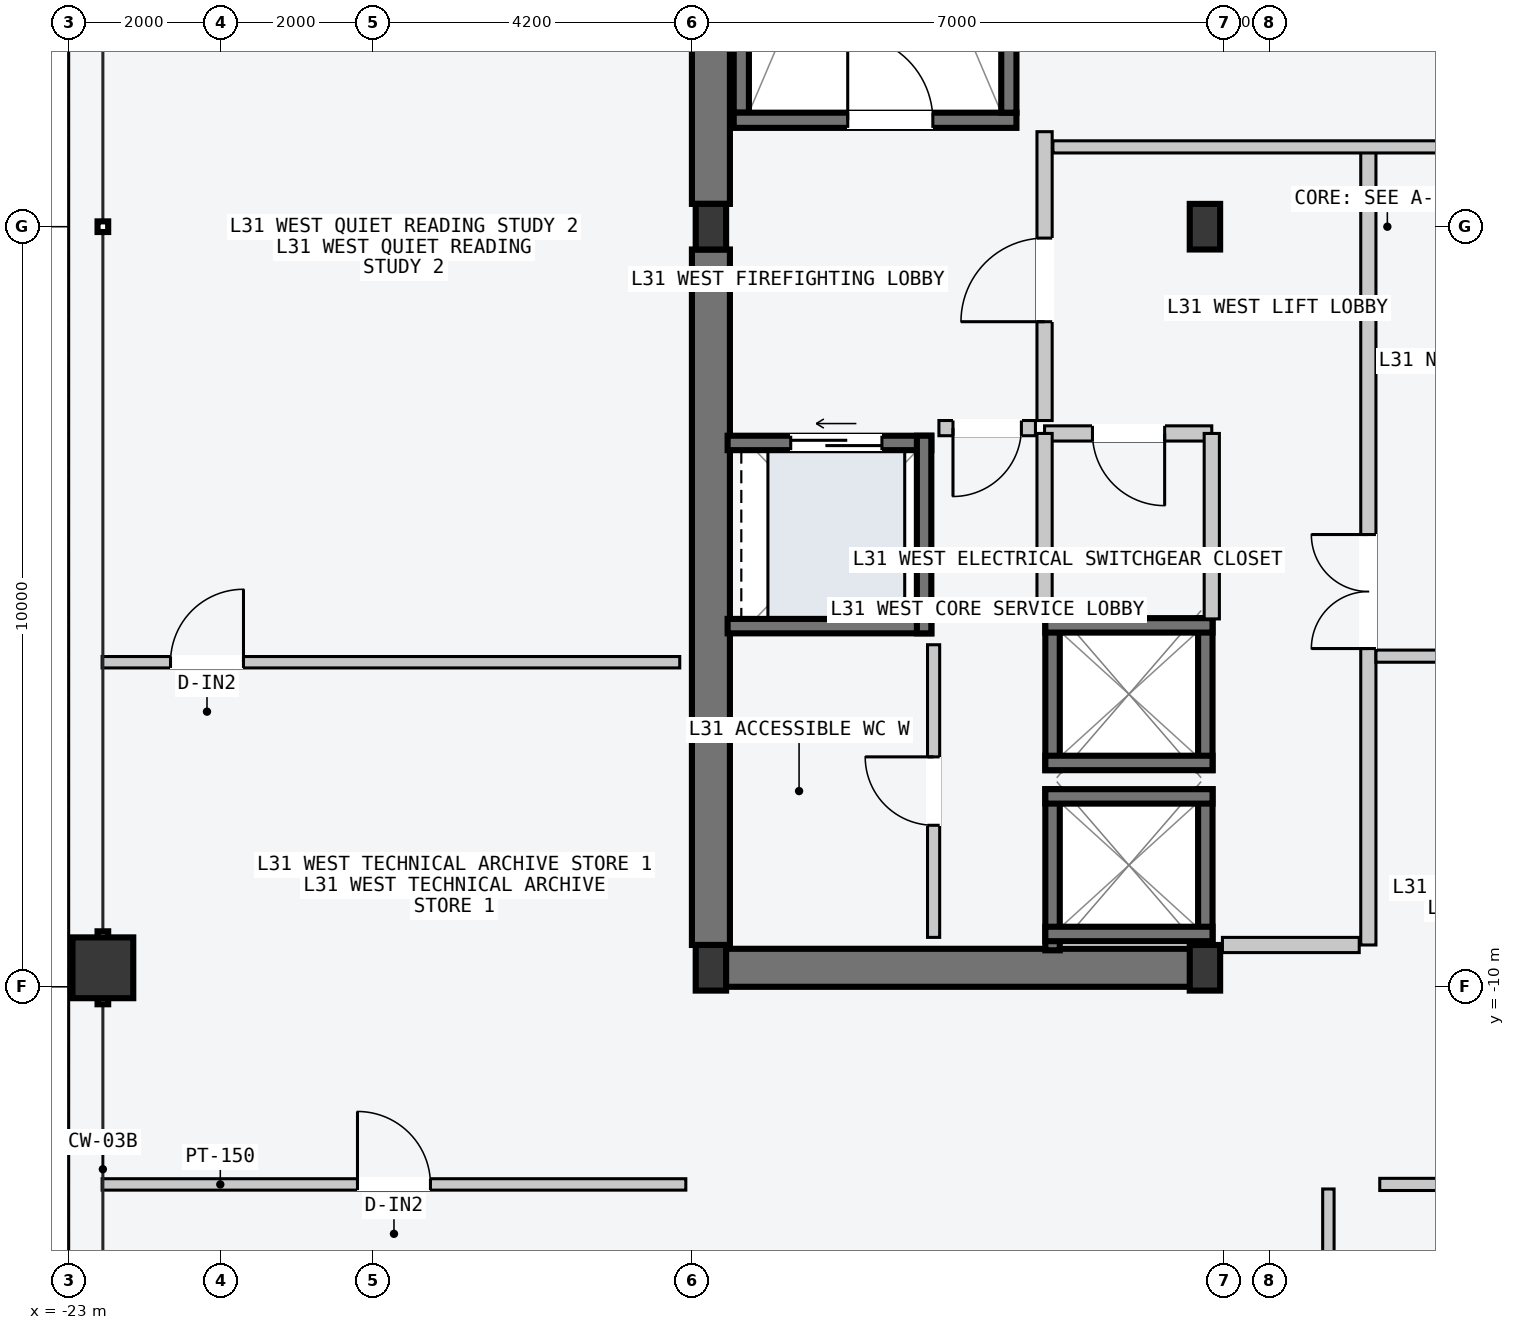
"""IFC4 building model, lengths in metres.
Left out: names, types, materials, properties, quantities, classifications, styles, units other than length and angle.
Written with IfcOpenShell. Run it as: python <this file> out.ifc"""

import sys

from ifc_helpers import new_model, si_unit, direction, frame, frame_2d, origin, origin_2d, place, context, subcontext, project, spatial, rectangle, hollow_rectangle, i_section, extrude, element, fill, save


model = new_model("IFC4")
c1 = context("Model", 3, precision=1e-05, world=origin(), true_north=direction((0.0, 1.0)))
c2 = subcontext(c1, "Body", "Model", "MODEL_VIEW")
j1 = project(units=[si_unit("LENGTHUNIT", "METRE"), si_unit("PLANEANGLEUNIT", "RADIAN")], contexts=[c1])
p1 = place(None, origin())
s1 = spatial("IfcSite", under=j1, at=p1, CompositionType="ELEMENT")
p2 = place(p1, origin())
s2 = spatial("IfcBuilding", under=s1, at=p2, CompositionType="ELEMENT")
p3 = place(p2, frame((0.0, 0.0, 120.6)))
s3 = spatial("IfcBuildingStorey", under=s2, at=p3, CompositionType="ELEMENT", Elevation=120.6)
p4 = place(p3, frame((-14.53, -9.75, -0.2), z_axis=(0.0, 0.0, 1.0), x_axis=(1.0, 0.0, 0.0)))
e1 = element("IfcWall", 1, at=p4, inside=s3, PredefinedType="SHEAR", context=c2, shape_type="SweptSolid", body=[
    extrude(rectangle(XDim=6.46, YDim=0.5, at=frame_2d((3.23, 0.0))), origin(), (0.0, 0.0, 1.0), 3.6),
])
for number, where, z_axis, x_axis in (
    (2, (-14.55, -9.45, -0.2), (0.0, 0.0, 1.0), (0.0, 1.0, 0.0)),
    (3, (-14.55, 0.3, -0.2), (0.0, 0.0, 1.0), (0.0, 1.0, 0.0)),
):
    element("IfcWall", number, at=place(p3, frame(where, z_axis=z_axis, x_axis=x_axis)), inside=s3, PredefinedType="SHEAR", context=c2, shape_type="SweptSolid", body=[
        extrude(rectangle(XDim=9.15, YDim=0.5, at=frame_2d((4.575, 0.0))), origin(), (0.0, 0.0, 1.0), 3.6),
    ])
p5 = place(p3, frame((-14.15, 1.5, -0.2), z_axis=(0.0, 0.0, 1.0), x_axis=(0.0, 1.0, 0.0)))
e4 = element("IfcWall", 4, at=p5, inside=s3, PredefinedType="SOLIDWALL", context=c2, shape_type="SweptSolid", body=[
    extrude(rectangle(XDim=7.8, YDim=0.2, at=frame_2d((3.9, 0.0))), origin(), (0.0, 0.0, 1.0), 3.6),
])
p6 = place(p3, frame((-14.25, 1.4, -0.2), z_axis=(0.0, 0.0, 1.0), x_axis=(1.0, 0.0, 0.0)))
e5 = element("IfcWall", 5, at=p6, inside=s3, PredefinedType="SOLIDWALL", context=c2, shape_type="SweptSolid", body=[
    extrude(rectangle(XDim=3.72, YDim=0.2, at=frame_2d((1.86, 0.0))), origin(), (0.0, 0.0, 1.0), 3.6),
])
p7 = place(p6, frame((1.5, 0.0, 0.2)))
e6 = element("IfcOpeningElement", 6, at=p7, cuts=e5, PredefinedType="OPENING", context=c2, shape_type="SweptSolid", body=[
    extrude(rectangle(XDim=1.12, YDim=2.18, at=frame_2d((0.56, 1.09))), frame((0.0, 0.11, 0.0), z_axis=(0.0, -1.0, 0.0), x_axis=(1.0, 0.0, 0.0)), (0.0, 0.0, 1.0), 0.22),
])
p8 = place(p3, frame((-10.63, 1.5, -0.2), z_axis=(0.0, 0.0, 1.0), x_axis=(0.0, 1.0, 0.0)))
e7 = element("IfcWall", 7, at=p8, inside=s3, PredefinedType="SOLIDWALL", context=c2, shape_type="SweptSolid", body=[
    extrude(rectangle(XDim=7.8, YDim=0.2, at=frame_2d((3.9, 0.0))), origin(), (0.0, 0.0, 1.0), 3.6),
])
for number, where, z_axis, x_axis in (
    (8, (-14.55, -9.75, 0.0), (0.0, 0.0, 1.0), (1.0, 0.0, 0.0)),
    (9, (-14.55, 0.0, 0.0), (0.0, 0.0, 1.0), (1.0, 0.0, 0.0)),
    (10, (-8.05, -9.75, 0.0), (0.0, 0.0, 1.0), (1.0, 0.0, 0.0)),
    (11, (-8.05, 0.0, 0.0), (0.0, 0.0, 1.0), (1.0, 0.0, 0.0)),
):
    element("IfcColumn", number, at=place(p3, frame(where, z_axis=z_axis, x_axis=x_axis)), inside=s3, PredefinedType="COLUMN", context=c2, shape_type="SweptSolid", body=[
        extrude(i_section(OverallWidth=0.4, OverallDepth=0.6, WebThickness=0.022, FlangeThickness=0.036, at=origin_2d()), origin(), (0.0, 0.0, 1.0), 3.6),
    ])
p9 = place(p3, frame((-22.55, -9.75, 0.0), z_axis=(0.0, 0.0, 1.0), x_axis=(0.0, 1.0, 0.0)))
e12 = element("IfcColumn", 12, at=p9, inside=s3, PredefinedType="COLUMN", context=c2, shape_type="SweptSolid", body=[
    extrude(hollow_rectangle(XDim=0.8, YDim=0.8, WallThickness=0.036, at=origin_2d()), origin(), (0.0, 0.0, 1.0), 3.6),
])
for number, where, z_axis, x_axis in (
    (13, (-8.045, -9.52, -0.2), (0.0, 0.0, 1.0), (0.0, 1.0, 0.0)),
    (14, (-10.055, -9.52, -0.2), (0.0, 0.0, 1.0), (0.0, 1.0, 0.0)),
):
    element("IfcWall", number, at=place(p3, frame(where, z_axis=z_axis, x_axis=x_axis)), inside=s3, PredefinedType="SOLIDWALL", context=c2, shape_type="SweptSolid", body=[
        extrude(rectangle(XDim=2.12, YDim=0.19, at=frame_2d((1.06, 0.0))), origin(), (0.0, 0.0, 1.0), 3.6),
    ])
for number, where, z_axis, x_axis in (
    (15, (-10.15, -7.495, -0.2), (0.0, 0.0, 1.0), (1.0, 0.0, 0.0)),
    (16, (-10.15, -9.305, -0.2), (0.0, 0.0, 1.0), (1.0, 0.0, 0.0)),
):
    element("IfcWall", number, at=place(p3, frame(where, z_axis=z_axis, x_axis=x_axis)), inside=s3, PredefinedType="SOLIDWALL", context=c2, shape_type="SweptSolid", body=[
        extrude(rectangle(XDim=2.2, YDim=0.19, at=frame_2d((1.1, 0.0))), origin(), (0.0, 0.0, 1.0), 3.6),
    ])
for number, where, z_axis, x_axis in (
    (17, (-8.045, -7.15, -0.2), (0.0, 0.0, 1.0), (0.0, 1.0, 0.0)),
    (18, (-10.055, -7.15, -0.2), (0.0, 0.0, 1.0), (0.0, 1.0, 0.0)),
):
    element("IfcWall", number, at=place(p3, frame(where, z_axis=z_axis, x_axis=x_axis)), inside=s3, PredefinedType="SOLIDWALL", context=c2, shape_type="SweptSolid", body=[
        extrude(rectangle(XDim=2.0, YDim=0.19, at=frame_2d((1.0, 0.0))), origin(), (0.0, 0.0, 1.0), 3.6),
    ])
for number, where, z_axis, x_axis in (
    (19, (-10.15, -5.245, -0.2), (0.0, 0.0, 1.0), (1.0, 0.0, 0.0)),
    (20, (-10.15, -7.055, -0.2), (0.0, 0.0, 1.0), (1.0, 0.0, 0.0)),
):
    element("IfcWall", number, at=place(p3, frame(where, z_axis=z_axis, x_axis=x_axis)), inside=s3, PredefinedType="SOLIDWALL", context=c2, shape_type="SweptSolid", body=[
        extrude(rectangle(XDim=2.2, YDim=0.19, at=frame_2d((1.1, 0.0))), origin(), (0.0, 0.0, 1.0), 3.6),
    ])
p10 = place(p3, frame((-14.33, -2.845, -0.2), z_axis=(0.0, 0.0, 1.0), x_axis=(1.0, 0.0, 0.0)))
e21 = element("IfcWall", 21, at=p10, inside=s3, PredefinedType="SOLIDWALL", context=c2, shape_type="SweptSolid", body=[
    extrude(rectangle(XDim=2.68, YDim=0.19, at=frame_2d((1.34, 0.0))), origin(), (0.0, 0.0, 1.0), 3.6),
])
p11 = place(p10, frame((0.83, 0.0, 0.2)))
e22 = element("IfcOpeningElement", 22, at=p11, cuts=e21, PredefinedType="OPENING", context=c2, shape_type="SweptSolid", body=[
    extrude(rectangle(XDim=1.2, YDim=2.2, at=frame_2d((0.6, 1.1))), frame((0.0, 0.105, 0.0), z_axis=(0.0, -1.0, 0.0), x_axis=(1.0, 0.0, 0.0)), (0.0, 0.0, 1.0), 0.21),
])
p12 = place(p3, frame((-14.33, -5.255, -0.2), z_axis=(0.0, 0.0, 1.0), x_axis=(1.0, 0.0, 0.0)))
e23 = element("IfcWall", 23, at=p12, inside=s3, PredefinedType="SOLIDWALL", context=c2, shape_type="SweptSolid", body=[
    extrude(rectangle(XDim=2.68, YDim=0.19, at=frame_2d((1.34, 0.0))), origin(), (0.0, 0.0, 1.0), 3.6),
])
p13 = place(p3, frame((-11.745, -5.35, -0.2), z_axis=(0.0, 0.0, 1.0), x_axis=(0.0, 1.0, 0.0)))
e24 = element("IfcWall", 24, at=p13, inside=s3, PredefinedType="SOLIDWALL", context=c2, shape_type="SweptSolid", body=[
    extrude(rectangle(XDim=2.6, YDim=0.19, at=frame_2d((1.3, 0.0))), origin(), (0.0, 0.0, 1.0), 3.6),
])
p14 = place(p3, frame((-5.9, -9.45, 0.0), z_axis=(0.0, 0.0, 1.0), x_axis=(0.0, 1.0, 0.0)))
e25 = element("IfcWall", 25, at=p14, inside=s3, PredefinedType="PARTITIONING", context=c2, shape_type="SweptSolid", body=[
    extrude(rectangle(XDim=10.5, YDim=0.2, at=frame_2d((5.25, 0.0))), origin(), (0.0, 0.0, 1.0), 3.4),
])
p15 = place(p14, frame((3.9, 0.0, 0.0)))
e26 = element("IfcOpeningElement", 26, at=p15, cuts=e25, PredefinedType="OPENING", context=c2, shape_type="SweptSolid", body=[
    extrude(rectangle(XDim=1.5, YDim=2.2, at=frame_2d((0.75, 1.1))), frame((0.0, 0.11, 0.0), z_axis=(0.0, -1.0, 0.0), x_axis=(1.0, 0.0, 0.0)), (0.0, 0.0, 1.0), 0.22),
])
p16 = place(p3, frame((-6.02, -9.45, 0.0), z_axis=(0.0, 0.0, 1.0), x_axis=(-1.0, 0.0, 0.0)))
e27 = element("IfcWall", 27, at=p16, inside=s3, PredefinedType="PARTITIONING", context=c2, shape_type="SweptSolid", body=[
    extrude(rectangle(XDim=1.8, YDim=0.2, at=frame_2d((0.9, 0.0))), origin(), (0.0, 0.0, 1.0), 3.4),
])
p17 = place(p3, frame((-10.16, -2.55, 0.0), z_axis=(0.0, 0.0, 1.0), x_axis=(0.0, 1.0, 0.0)))
e28 = element("IfcWall", 28, at=p17, inside=s3, PredefinedType="PARTITIONING", context=c2, shape_type="SweptSolid", body=[
    extrude(rectangle(XDim=3.8, YDim=0.2, at=frame_2d((1.9, 0.0))), origin(), (0.0, 0.0, 1.0), 3.4),
])
p18 = place(p17, frame((1.3, 0.0, 0.0)))
e29 = element("IfcOpeningElement", 29, at=p18, cuts=e28, PredefinedType="OPENING", context=c2, shape_type="SweptSolid", body=[
    extrude(rectangle(XDim=1.1, YDim=2.15, at=frame_2d((0.55, 1.075))), frame((0.0, 0.11, 0.0), z_axis=(0.0, -1.0, 0.0), x_axis=(1.0, 0.0, 0.0)), (0.0, 0.0, 1.0), 0.22),
])
p19 = place(p3, frame((-10.28, -2.65, 0.0), z_axis=(0.0, 0.0, 1.0), x_axis=(-1.0, 0.0, 0.0)))
e30 = element("IfcWall", 30, at=p19, inside=s3, PredefinedType="PARTITIONING", context=c2, shape_type="SweptSolid", body=[
    extrude(rectangle(XDim=1.27, YDim=0.2, at=frame_2d((0.635, 0.0))), origin(), (0.0, 0.0, 1.0), 3.4),
])
p20 = place(p19, frame((0.185, 0.0, 0.0)))
e31 = element("IfcOpeningElement", 31, at=p20, cuts=e30, PredefinedType="OPENING", context=c2, shape_type="SweptSolid", body=[
    extrude(rectangle(XDim=0.9, YDim=2.15, at=frame_2d((0.45, 1.075))), frame((0.0, 0.11, 0.0), z_axis=(0.0, -1.0, 0.0), x_axis=(1.0, 0.0, 0.0)), (0.0, 0.0, 1.0), 0.22),
])
p21 = place(p3, frame((-7.96, -2.72, 0.0), z_axis=(0.0, 0.0, 1.0), x_axis=(-1.0, 0.0, 0.0)))
e32 = element("IfcWall", 32, at=p21, inside=s3, PredefinedType="PARTITIONING", context=c2, shape_type="SweptSolid", body=[
    extrude(rectangle(XDim=2.2, YDim=0.2, at=frame_2d((1.1, 0.0))), origin(), (0.0, 0.0, 1.0), 3.4),
])
p22 = place(p21, frame((0.62, 0.0, 0.0)))
e33 = element("IfcOpeningElement", 33, at=p22, cuts=e32, PredefinedType="OPENING", context=c2, shape_type="SweptSolid", body=[
    extrude(rectangle(XDim=0.95, YDim=2.1, at=frame_2d((0.475, 1.05))), frame((0.0, 0.11, 0.0), z_axis=(0.0, -1.0, 0.0), x_axis=(1.0, 0.0, 0.0)), (0.0, 0.0, 1.0), 0.22),
])
for number, where, z_axis, x_axis in (
    (34, (-7.96, -5.16, 0.0), (0.0, 0.0, 1.0), (0.0, 1.0, 0.0)),
    (35, (-10.16, -5.16, 0.0), (0.0, 0.0, 1.0), (0.0, 1.0, 0.0)),
):
    element("IfcWall", number, at=place(p3, frame(where, z_axis=z_axis, x_axis=x_axis)), inside=s3, PredefinedType="PARTITIONING", context=c2, shape_type="SweptSolid", body=[
        extrude(rectangle(XDim=2.44, YDim=0.2, at=frame_2d((1.22, 0.0))), origin(), (0.0, 0.0, 1.0), 3.4),
    ])
p23 = place(p3, frame((-11.62, -9.35, 0.0), z_axis=(0.0, 0.0, 1.0), x_axis=(0.0, 1.0, 0.0)))
e36 = element("IfcWall", 36, at=p23, inside=s3, PredefinedType="PARTITIONING", context=c2, shape_type="SweptSolid", body=[
    extrude(rectangle(XDim=3.85, YDim=0.16, at=frame_2d((1.925, 0.0))), origin(), (0.0, 0.0, 1.0), 3.4),
])
p24 = place(p23, frame((1.475, 0.0, 0.0)))
e37 = element("IfcOpeningElement", 37, at=p24, cuts=e36, PredefinedType="OPENING", context=c2, shape_type="SweptSolid", body=[
    extrude(rectangle(XDim=0.9, YDim=2.15, at=frame_2d((0.45, 1.075))), frame((0.0, 0.09, 0.0), z_axis=(0.0, -1.0, 0.0), x_axis=(1.0, 0.0, 0.0)), (0.0, 0.0, 1.0), 0.18),
])
p25 = place(p3, frame((-10.05, 1.05, 0.0), z_axis=(0.0, 0.0, 1.0), x_axis=(1.0, 0.0, 0.0)))
e38 = element("IfcWall", 38, at=p25, inside=s3, PredefinedType="PARTITIONING", context=c2, shape_type="SweptSolid", body=[
    extrude(rectangle(XDim=6.21, YDim=0.16, at=frame_2d((3.105, 0.0))), origin(), (0.0, 0.0, 1.0), 3.4),
])
p26 = place(p3, frame((-5.8, -5.65, 0.0), z_axis=(0.0, 0.0, 1.0), x_axis=(1.0, 0.0, 0.0)))
e39 = element("IfcWall", 39, at=p26, inside=s3, PredefinedType="PARTITIONING", context=c2, shape_type="SweptSolid", body=[
    extrude(rectangle(XDim=11.6, YDim=0.16, at=frame_2d((5.8, 0.0))), origin(), (0.0, 0.0, 1.0), 3.4),
])
p27 = place(p26, frame((5.1, 0.0, 0.0)))
e40 = element("IfcOpeningElement", 40, at=p27, cuts=e39, PredefinedType="OPENING", context=c2, shape_type="SweptSolid", body=[
    extrude(rectangle(XDim=1.4, YDim=2.2, at=frame_2d((0.7, 1.1))), frame((0.0, 0.09, 0.0), z_axis=(0.0, -1.0, 0.0), x_axis=(1.0, 0.0, 0.0)), (0.0, 0.0, 1.0), 0.18),
])
p28 = place(p3, frame((-6.426, -19.56, 0.0), z_axis=(0.0, 0.0, 1.0), x_axis=(0.0, 1.0, 0.0)))
e41 = element("IfcWall", 41, at=p28, inside=s3, PredefinedType="PARTITIONING", context=c2, shape_type="SweptSolid", body=[
    extrude(rectangle(XDim=6.9, YDim=0.15, at=frame_2d((3.45, 0.0))), origin(), (0.0, 0.0, 1.0), 3.4),
])
p29 = place(p28, frame((1.34, 0.0, 0.0)))
e42 = element("IfcOpeningElement", 42, at=p29, cuts=e41, PredefinedType="OPENING", context=c2, shape_type="SweptSolid", body=[
    extrude(rectangle(XDim=0.96, YDim=2.18, at=frame_2d((0.48, 1.09))), frame((0.0, 0.085, 0.0), z_axis=(0.0, -1.0, 0.0), x_axis=(1.0, 0.0, 0.0)), (0.0, 0.0, 1.0), 0.17),
])
p30 = place(p3, frame((-5.75, -12.6, 0.0), z_axis=(0.0, 0.0, 1.0), x_axis=(1.0, 0.0, 0.0)))
e43 = element("IfcWall", 43, at=p30, inside=s3, PredefinedType="PARTITIONING", context=c2, shape_type="SweptSolid", body=[
    extrude(rectangle(XDim=11.5, YDim=0.16, at=frame_2d((5.75, 0.0))), origin(), (0.0, 0.0, 1.0), 3.4),
])
p31 = place(p30, frame((3.579, 0.0, 0.0)))
e44 = element("IfcOpeningElement", 44, at=p31, cuts=e43, PredefinedType="OPENING", context=c2, shape_type="SweptSolid", body=[
    extrude(rectangle(XDim=0.96, YDim=2.18, at=frame_2d((0.48, 1.09))), frame((0.0, 0.09, 0.0), z_axis=(0.0, -1.0, 0.0), x_axis=(1.0, 0.0, 0.0)), (0.0, 0.0, 1.0), 0.18),
])
p32 = place(p30, frame((9.299, 0.0, 0.0)))
e45 = element("IfcOpeningElement", 45, at=p32, cuts=e43, PredefinedType="OPENING", context=c2, shape_type="SweptSolid", body=[
    extrude(rectangle(XDim=1.02, YDim=2.2, at=frame_2d((0.51, 1.1))), frame((0.0, 0.09, 0.0), z_axis=(0.0, -1.0, 0.0), x_axis=(1.0, 0.0, 0.0)), (0.0, 0.0, 1.0), 0.18),
])
p33 = place(p3, frame((-22.56, -12.6, 0.0), z_axis=(0.0, 0.0, 1.0), x_axis=(1.0, 0.0, 0.0)))
e46 = element("IfcWall", 46, at=p33, inside=s3, PredefinedType="PARTITIONING", context=c2, shape_type="SweptSolid", body=[
    extrude(rectangle(XDim=7.68, YDim=0.15, at=frame_2d((3.84, 0.0))), origin(), (0.0, 0.0, 1.0), 3.4),
])
p34 = place(p33, frame((3.36, 0.0, 0.0)))
e47 = element("IfcOpeningElement", 47, at=p34, cuts=e46, PredefinedType="OPENING", context=c2, shape_type="SweptSolid", body=[
    extrude(rectangle(XDim=0.96, YDim=2.18, at=frame_2d((0.48, 1.09))), frame((0.0, 0.085, 0.0), z_axis=(0.0, -1.0, 0.0), x_axis=(1.0, 0.0, 0.0)), (0.0, 0.0, 1.0), 0.17),
])
p35 = place(p3, frame((-22.56, -5.73, 0.0), z_axis=(0.0, 0.0, 1.0), x_axis=(1.0, 0.0, 0.0)))
e48 = element("IfcWall", 48, at=p35, inside=s3, PredefinedType="PARTITIONING", context=c2, shape_type="SweptSolid", body=[
    extrude(rectangle(XDim=7.6, YDim=0.15, at=frame_2d((3.8, 0.0))), origin(), (0.0, 0.0, 1.0), 3.4),
])
p36 = place(p35, frame((0.9, 0.0, 0.0)))
e49 = element("IfcOpeningElement", 49, at=p36, cuts=e48, PredefinedType="OPENING", context=c2, shape_type="SweptSolid", body=[
    extrude(rectangle(XDim=0.96, YDim=2.18, at=frame_2d((0.48, 1.09))), frame((0.0, 0.085, 0.0), z_axis=(0.0, -1.0, 0.0), x_axis=(1.0, 0.0, 0.0)), (0.0, 0.0, 1.0), 0.17),
])
p37 = place(p7, origin())
e50 = element("IfcDoor", 50, at=p37, inside=s3, OperationType="SINGLE_SWING_LEFT", PredefinedType="DOOR", context=c2, shape_type="SweptSolid", body=[
    extrude(rectangle(XDim=1.12, YDim=2.18, at=frame_2d((0.56, 1.09))), frame((0.0, 0.025, 0.0), z_axis=(0.0, -1.0, 0.0), x_axis=(1.0, 0.0, 0.0)), (0.0, 0.0, 1.0), 0.05),
])
fill(e6, e50)
p38 = place(p11, origin())
e51 = element("IfcDoor", 51, at=p38, inside=s3, OperationType="SLIDING_TO_LEFT", PredefinedType="DOOR", context=c2, shape_type="SweptSolid", body=[
    extrude(rectangle(XDim=1.2, YDim=2.2, at=frame_2d((0.6, 1.1))), frame((0.0, 0.025, 0.0), z_axis=(0.0, -1.0, 0.0), x_axis=(1.0, 0.0, 0.0)), (0.0, 0.0, 1.0), 0.05),
])
fill(e22, e51)
p39 = place(p15, origin())
e52 = element("IfcDoor", 52, at=p39, inside=s3, OperationType="DOUBLE_DOOR_SINGLE_SWING", PredefinedType="DOOR", context=c2, shape_type="SweptSolid", body=[
    extrude(rectangle(XDim=1.5, YDim=2.2, at=frame_2d((0.75, 1.1))), frame((0.0, 0.025, 0.0), z_axis=(0.0, -1.0, 0.0), x_axis=(1.0, 0.0, 0.0)), (0.0, 0.0, 1.0), 0.05),
])
fill(e26, e52)
p40 = place(p18, origin())
e53 = element("IfcDoor", 53, at=p40, inside=s3, OperationType="SINGLE_SWING_LEFT", PredefinedType="DOOR", context=c2, shape_type="SweptSolid", body=[
    extrude(rectangle(XDim=1.1, YDim=2.15, at=frame_2d((0.55, 1.075))), frame((0.0, 0.025, 0.0), z_axis=(0.0, -1.0, 0.0), x_axis=(1.0, 0.0, 0.0)), (0.0, 0.0, 1.0), 0.05),
])
fill(e29, e53)
p41 = place(p20, origin())
e54 = element("IfcDoor", 54, at=p41, inside=s3, OperationType="SINGLE_SWING_RIGHT", PredefinedType="DOOR", context=c2, shape_type="SweptSolid", body=[
    extrude(rectangle(XDim=0.9, YDim=2.15, at=frame_2d((0.45, 1.075))), frame((0.0, 0.025, 0.0), z_axis=(0.0, -1.0, 0.0), x_axis=(1.0, 0.0, 0.0)), (0.0, 0.0, 1.0), 0.05),
])
fill(e31, e54)
p42 = place(p22, origin())
e55 = element("IfcDoor", 55, at=p42, inside=s3, OperationType="SINGLE_SWING_LEFT", PredefinedType="DOOR", context=c2, shape_type="SweptSolid", body=[
    extrude(rectangle(XDim=0.95, YDim=2.1, at=frame_2d((0.475, 1.05))), frame((0.0, 0.025, 0.0), z_axis=(0.0, -1.0, 0.0), x_axis=(1.0, 0.0, 0.0)), (0.0, 0.0, 1.0), 0.05),
])
fill(e33, e55)
p43 = place(p24, origin())
e56 = element("IfcDoor", 56, at=p43, inside=s3, OperationType="SINGLE_SWING_RIGHT", PredefinedType="DOOR", context=c2, shape_type="SweptSolid", body=[
    extrude(rectangle(XDim=0.9, YDim=2.15, at=frame_2d((0.45, 1.075))), frame((0.0, 0.025, 0.0), z_axis=(0.0, -1.0, 0.0), x_axis=(1.0, 0.0, 0.0)), (0.0, 0.0, 1.0), 0.05),
])
fill(e37, e56)
p44 = place(p34, origin())
e57 = element("IfcDoor", 57, at=p44, inside=s3, OperationType="SINGLE_SWING_LEFT", PredefinedType="DOOR", context=c2, shape_type="SweptSolid", body=[
    extrude(rectangle(XDim=0.96, YDim=2.18, at=frame_2d((0.48, 1.09))), frame((0.0, 0.025, 0.0), z_axis=(0.0, -1.0, 0.0), x_axis=(1.0, 0.0, 0.0)), (0.0, 0.0, 1.0), 0.05),
])
fill(e47, e57)
p45 = place(p36, origin())
e58 = element("IfcDoor", 58, at=p45, inside=s3, OperationType="SINGLE_SWING_RIGHT", PredefinedType="DOOR", context=c2, shape_type="SweptSolid", body=[
    extrude(rectangle(XDim=0.96, YDim=2.18, at=frame_2d((0.48, 1.09))), frame((0.0, 0.025, 0.0), z_axis=(0.0, -1.0, 0.0), x_axis=(1.0, 0.0, 0.0)), (0.0, 0.0, 1.0), 0.05),
])
fill(e49, e58)
save(model, sys.argv[1])
